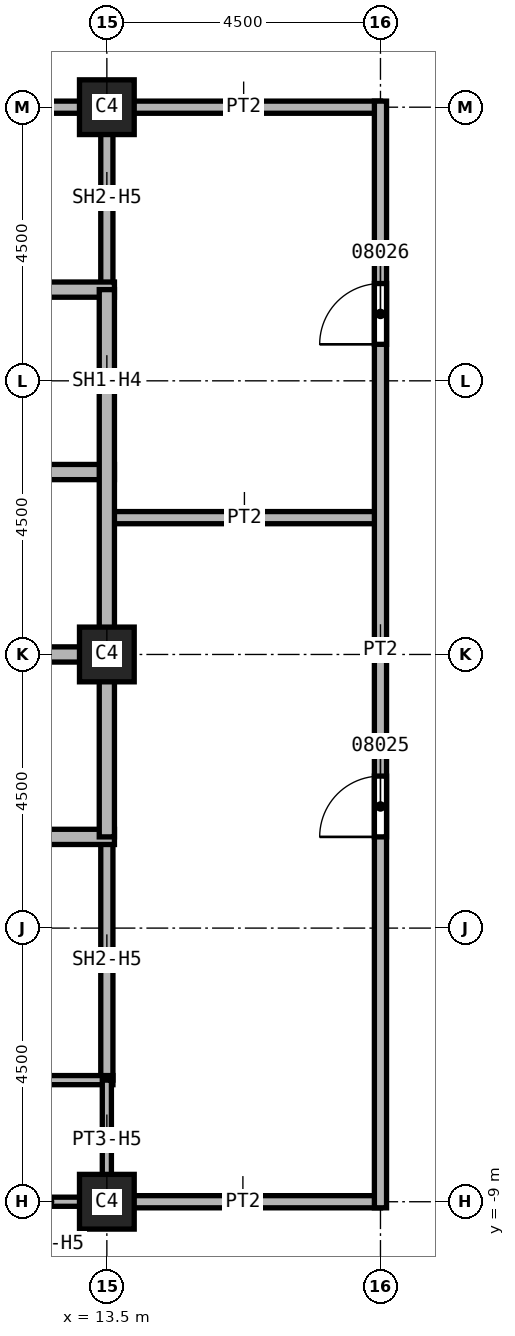
"""IFC4 building model, lengths in metres.
Left out: names, types, materials, properties, quantities, classifications, styles, units other than length and angle.
Written with IfcOpenShell. Run it as: python <this file> out.ifc"""

import sys

from ifc_helpers import new_model, si_unit, direction, frame, frame_2d, origin, origin_2d, place, context, subcontext, project, spatial, rectangle, extrude, element, fill, save


model = new_model("IFC4")
c1 = context("Model", 3, precision=1e-05, world=origin(), true_north=direction((0.0, 1.0)))
c2 = subcontext(c1, "Body", "Model", "MODEL_VIEW")
j1 = project(units=[si_unit("LENGTHUNIT", "METRE"), si_unit("PLANEANGLEUNIT", "RADIAN")], contexts=[c1])
p1 = place(None, origin())
s1 = spatial("IfcSite", under=j1, at=p1, CompositionType="ELEMENT")
p2 = place(p1, origin())
s2 = spatial("IfcBuilding", under=s1, at=p2, CompositionType="ELEMENT")
p3 = place(p2, frame((0.0, 0.0, 150.0)))
s3 = spatial("IfcBuildingStorey", under=s2, at=p3, CompositionType="ELEMENT", Elevation=150.0)
for number, where, z_axis, x_axis in (
    (1, (13.5, 0.0, 0.0), (0.0, 0.0, 1.0), (1.0, 0.0, 0.0)),
    (2, (13.5, 9.0, 0.0), (0.0, 0.0, 1.0), (1.0, 0.0, 0.0)),
    (3, (13.5, -9.0, 0.0), (0.0, 0.0, 1.0), (1.0, 0.0, 0.0)),
):
    element("IfcColumn", number, at=place(p3, frame(where, z_axis=z_axis, x_axis=x_axis)), inside=s3, PredefinedType="COLUMN", context=c2, shape_type="SweptSolid", body=[
        extrude(rectangle(XDim=0.9, YDim=0.9, at=origin_2d()), origin(), (0.0, 0.0, 1.0), 3.7),
    ])
for number, where, z_axis, x_axis in (
    (4, (13.5, -9.0, 0.0), (0.0, 0.0, 1.0), (1.0, 0.0, 0.0)),
    (5, (13.5, 2.25, 0.0), (0.0, 0.0, 1.0), (1.0, 0.0, 0.0)),
    (6, (18.0, 9.0, 0.0), (0.0, 0.0, 1.0), (-1.0, 0.0, 0.0)),
):
    element("IfcWall", number, at=place(p3, frame(where, z_axis=z_axis, x_axis=x_axis)), inside=s3, PredefinedType="PARTITIONING", context=c2, shape_type="SweptSolid", body=[
        extrude(rectangle(XDim=4.5, YDim=0.2, at=frame_2d((2.25, 0.0))), origin(), (0.0, 0.0, 1.0), 3.7),
    ])
p4 = place(p3, frame((18.0, -9.1, 0.0), z_axis=(0.0, 0.0, 1.0), x_axis=(0.0, 1.0, 0.0)))
e7 = element("IfcWall", 7, at=p4, inside=s3, PredefinedType="PARTITIONING", context=c2, shape_type="SweptSolid", body=[
    extrude(rectangle(XDim=18.2, YDim=0.2, at=frame_2d((9.1, 0.0))), origin(), (0.0, 0.0, 1.0), 3.7),
])
p5 = place(p4, frame((6.1, 0.0, 0.0)))
e8 = element("IfcOpeningElement", 8, at=p5, cuts=e7, PredefinedType="OPENING", context=c2, shape_type="SweptSolid", body=[
    extrude(rectangle(XDim=1.0, YDim=2.1, at=frame_2d((0.5, 1.05))), frame((0.0, 0.1, 0.0), z_axis=(0.0, -1.0, 0.0), x_axis=(1.0, 0.0, 0.0)), (0.0, 0.0, 1.0), 0.2),
])
p6 = place(p4, frame((14.2, 0.0, 0.0)))
e9 = element("IfcOpeningElement", 9, at=p6, cuts=e7, PredefinedType="OPENING", context=c2, shape_type="SweptSolid", body=[
    extrude(rectangle(XDim=1.0, YDim=2.1, at=frame_2d((0.5, 1.05))), frame((0.0, 0.1, 0.0), z_axis=(0.0, -1.0, 0.0), x_axis=(1.0, 0.0, 0.0)), (0.0, 0.0, 1.0), 0.2),
])
p7 = place(p3, frame((10.5, 9.0, 0.0), z_axis=(0.0, 0.0, 1.0), x_axis=(1.0, 0.0, 0.0)))
e10 = element("IfcWall", 10, at=p7, inside=s3, PredefinedType="SOLIDWALL", context=c2, shape_type="SweptSolid", body=[
    extrude(rectangle(XDim=3.1, YDim=0.2, at=frame_2d((1.55, 0.0))), origin(), (0.0, 0.0, 1.0), 2.938),
])
p8 = place(p3, frame((13.5, -3.0, 0.0), z_axis=(0.0, 0.0, 1.0), x_axis=(0.0, -1.0, 0.0)))
e11 = element("IfcWall", 11, at=p8, inside=s3, PredefinedType="SOLIDWALL", context=c2, shape_type="SweptSolid", body=[
    extrude(rectangle(XDim=4.0, YDim=0.2, at=frame_2d((2.0, 0.0))), origin(), (0.0, 0.0, 1.0), 2.938),
])
p9 = place(p3, frame((13.5, 9.1, 0.0), z_axis=(0.0, 0.0, 1.0), x_axis=(0.0, -1.0, 0.0)))
e12 = element("IfcWall", 12, at=p9, inside=s3, PredefinedType="SOLIDWALL", context=c2, shape_type="SweptSolid", body=[
    extrude(rectangle(XDim=3.1, YDim=0.2, at=frame_2d((1.55, 0.0))), origin(), (0.0, 0.0, 1.0), 2.938),
])
p10 = place(p3, frame((4.375, 3.0, 0.0), z_axis=(0.0, 0.0, 1.0), x_axis=(1.0, 0.0, 0.0)))
e13 = element("IfcWall", 13, at=p10, inside=s3, PredefinedType="SOLIDWALL", context=c2, shape_type="SweptSolid", body=[
    extrude(rectangle(XDim=9.25, YDim=0.25, at=frame_2d((4.625, 0.0))), origin(), (0.0, 0.0, 1.0), 3.7),
])
p11 = place(p10, frame((3.375, 0.0, 0.0)))
e14 = element("IfcOpeningElement", 14, at=p11, cuts=e13, PredefinedType="OPENING", context=c2, shape_type="SweptSolid", body=[
    extrude(rectangle(XDim=1.1, YDim=2.1, at=frame_2d((0.55, 1.05))), frame((0.0, 0.125, 0.0), z_axis=(0.0, -1.0, 0.0), x_axis=(1.0, 0.0, 0.0)), (0.0, 0.0, 1.0), 0.25),
])
p12 = place(p3, frame((7.5, -3.0, 0.0), z_axis=(0.0, 0.0, 1.0), x_axis=(1.0, 0.0, 0.0)))
e15 = element("IfcWall", 15, at=p12, inside=s3, PredefinedType="SOLIDWALL", context=c2, shape_type="SweptSolid", body=[
    extrude(rectangle(XDim=6.125, YDim=0.25, at=frame_2d((3.062, 0.0))), origin(), (0.0, 0.0, 1.0), 3.7),
])
p13 = place(p12, frame((0.25, 0.0, 0.0)))
e16 = element("IfcOpeningElement", 16, at=p13, cuts=e15, PredefinedType="OPENING", context=c2, shape_type="SweptSolid", body=[
    extrude(rectangle(XDim=1.1, YDim=2.1, at=frame_2d((0.55, 1.05))), frame((0.0, 0.125, 0.0), z_axis=(0.0, -1.0, 0.0), x_axis=(1.0, 0.0, 0.0)), (0.0, 0.0, 1.0), 0.25),
])
for number, where, z_axis, x_axis in (
    (17, (10.5, 0.0, 0.0), (0.0, 0.0, 1.0), (1.0, 0.0, 0.0)),
    (18, (10.5, 6.0, 0.0), (0.0, 0.0, 1.0), (1.0, 0.0, 0.0)),
):
    element("IfcWall", number, at=place(p3, frame(where, z_axis=z_axis, x_axis=x_axis)), inside=s3, PredefinedType="SOLIDWALL", context=c2, shape_type="SweptSolid", body=[
        extrude(rectangle(XDim=3.125, YDim=0.25, at=frame_2d((1.562, 0.0))), origin(), (0.0, 0.0, 1.0), 3.7),
    ])
p14 = place(p3, frame((13.5, 6.0, 0.0), z_axis=(0.0, 0.0, 1.0), x_axis=(0.0, -1.0, 0.0)))
e19 = element("IfcWall", 19, at=p14, inside=s3, PredefinedType="SOLIDWALL", context=c2, shape_type="SweptSolid", body=[
    extrude(rectangle(XDim=9.0, YDim=0.25, at=frame_2d((4.5, 0.0))), origin(), (0.0, 0.0, 1.0), 2.938),
])
p15 = place(p3, frame((10.5, -7.0, 0.0), z_axis=(0.0, 0.0, 1.0), x_axis=(1.0, 0.0, 0.0)))
e20 = element("IfcWall", 20, at=p15, inside=s3, PredefinedType="PARTITIONING", context=c2, shape_type="SweptSolid", body=[
    extrude(rectangle(XDim=3.1, YDim=0.15, at=frame_2d((1.55, 0.0))), origin(), (0.0, 0.0, 1.0), 3.7),
])
p16 = place(p3, frame((13.5, -7.0, 0.0), z_axis=(0.0, 0.0, 1.0), x_axis=(0.0, -1.0, 0.0)))
e21 = element("IfcWall", 21, at=p16, inside=s3, PredefinedType="PARTITIONING", context=c2, shape_type="SweptSolid", body=[
    extrude(rectangle(XDim=2.1, YDim=0.15, at=frame_2d((1.05, 0.0))), origin(), (0.0, 0.0, 1.0), 2.938),
])
p17 = place(p3, frame((13.575, -9.0, 0.0), z_axis=(0.0, 0.0, 1.0), x_axis=(-1.0, 0.0, 0.0)))
e22 = element("IfcWall", 22, at=p17, inside=s3, PredefinedType="PARTITIONING", context=c2, shape_type="SweptSolid", body=[
    extrude(rectangle(XDim=3.075, YDim=0.15, at=frame_2d((1.538, 0.0))), origin(), (0.0, 0.0, 1.0), 2.938),
])
p18 = place(p17, frame((1.9, 0.0, 0.0)))
e23 = element("IfcOpeningElement", 23, at=p18, cuts=e22, PredefinedType="OPENING", context=c2, shape_type="SweptSolid", body=[
    extrude(rectangle(XDim=0.9, YDim=2.1, at=frame_2d((0.45, 1.05))), frame((0.0, 0.075, 0.0), z_axis=(0.0, -1.0, 0.0), x_axis=(1.0, 0.0, 0.0)), (0.0, 0.0, 1.0), 0.15),
])
p19 = place(p5, origin())
e24 = element("IfcDoor", 24, at=p19, inside=s3, OperationType="SINGLE_SWING_RIGHT", PredefinedType="DOOR", context=c2, shape_type="SweptSolid", body=[
    extrude(rectangle(XDim=1.0, YDim=2.1, at=frame_2d((0.5, 1.05))), frame((0.0, 0.025, 0.0), z_axis=(0.0, -1.0, 0.0), x_axis=(1.0, 0.0, 0.0)), (0.0, 0.0, 1.0), 0.05),
])
fill(e8, e24)
p20 = place(p6, origin())
e25 = element("IfcDoor", 25, at=p20, inside=s3, OperationType="SINGLE_SWING_LEFT", PredefinedType="DOOR", context=c2, shape_type="SweptSolid", body=[
    extrude(rectangle(XDim=1.0, YDim=2.1, at=frame_2d((0.5, 1.05))), frame((0.0, 0.025, 0.0), z_axis=(0.0, -1.0, 0.0), x_axis=(1.0, 0.0, 0.0)), (0.0, 0.0, 1.0), 0.05),
])
fill(e9, e25)
save(model, sys.argv[1])
